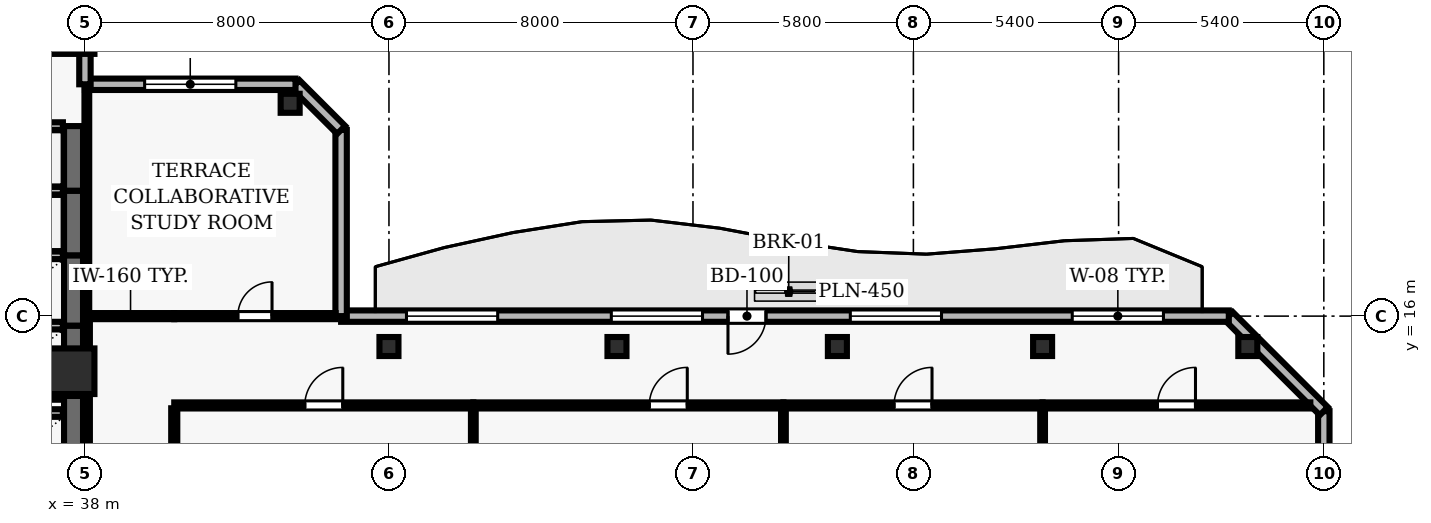
"""IFC4 building model, lengths in metres.
Left out: names, types, materials, properties, quantities, classifications, styles, units other than length and angle.
Written with IfcOpenShell. Run it as: python <this file> out.ifc"""

import sys

from ifc_helpers import new_model, si_unit, direction, frame, frame_2d, origin, origin_2d, place, context, subcontext, project, spatial, rectangle, hollow_rectangle, extrude, element, fill, save


model = new_model("IFC4")
c1 = context("Model", 3, precision=1e-05, world=origin(), true_north=direction((0.0, 1.0)))
c2 = subcontext(c1, "Body", "Model", "MODEL_VIEW")
j1 = project(units=[si_unit("LENGTHUNIT", "METRE"), si_unit("PLANEANGLEUNIT", "RADIAN")], contexts=[c1])
p1 = place(None, origin())
s1 = spatial("IfcSite", under=j1, at=p1, CompositionType="ELEMENT")
p2 = place(p1, origin())
s2 = spatial("IfcBuilding", under=s1, at=p2, CompositionType="ELEMENT")
p3 = place(p2, frame((0.0, 0.0, 161.9)))
s3 = spatial("IfcBuildingStorey", under=s2, at=p3, CompositionType="ELEMENT", Elevation=161.9)
for number, where, z_axis, x_axis in (
    (1, (37.65, 14.55, 0.0), (0.0, 0.0, 1.0), (1.0, 0.0, 0.0)),
    (2, (37.65, 23.5, 0.0), (0.0, 0.0, 1.0), (1.0, 0.0, 0.0)),
):
    element("IfcColumn", number, at=place(p3, frame(where, z_axis=z_axis, x_axis=x_axis)), inside=s3, PredefinedType="COLUMN", context=c2, shape_type="SweptSolid", body=[
        extrude(rectangle(XDim=1.2, YDim=1.2, at=origin_2d()), origin(), (0.0, 0.0, 1.0), 3.9),
    ])
for number, where, z_axis, x_axis in (
    (3, (46.0, 15.2, 0.0), (0.0, 0.0, 1.0), (1.0, 0.0, 0.0)),
    (4, (52.0, 15.2, 0.0), (0.0, 0.0, 1.0), (1.0, 0.0, 0.0)),
    (5, (57.8, 15.2, 0.0), (0.0, 0.0, 1.0), (1.0, 0.0, 0.0)),
    (6, (63.2, 15.2, 0.0), (0.0, 0.0, 1.0), (1.0, 0.0, 0.0)),
    (7, (68.6, 15.2, 0.0), (0.0, 0.0, 1.0), (1.0, 0.0, 0.0)),
    (8, (43.4, 21.6, 0.0), (0.0, 0.0, 1.0), (1.0, 0.0, 0.0)),
):
    element("IfcColumn", number, at=place(p3, frame(where, z_axis=z_axis, x_axis=x_axis)), inside=s3, PredefinedType="COLUMN", context=c2, shape_type="SweptSolid", body=[
        extrude(hollow_rectangle(XDim=0.5, YDim=0.5, WallThickness=0.025, at=origin_2d()), origin(), (0.0, 0.0, 1.0), 3.9),
    ])
p4 = place(p3, frame((70.6, 2.5, 0.0), z_axis=(0.0, 0.0, 1.0), x_axis=(0.0, 1.0, 0.0)))
e9 = element("IfcWall", 9, at=p4, inside=s3, PredefinedType="SOLIDWALL", context=c2, shape_type="SweptSolid", body=[
    extrude(rectangle(XDim=11.0, YDim=0.3, at=frame_2d((5.5, 0.0))), origin(), (0.0, 0.0, 1.0), 3.64),
])
p5 = place(p4, frame((2.0, 0.0, 0.9)))
e10 = element("IfcOpeningElement", 10, at=p5, cuts=e9, PredefinedType="OPENING", context=c2, shape_type="SweptSolid", body=[
    extrude(rectangle(XDim=1.5, YDim=1.8, at=frame_2d((0.75, 0.9))), frame((0.0, 0.16, 0.0), z_axis=(0.0, -1.0, 0.0), x_axis=(1.0, 0.0, 0.0)), (0.0, 0.0, 1.0), 0.32),
])
p6 = place(p4, frame((7.5, 0.0, 0.9)))
e11 = element("IfcOpeningElement", 11, at=p6, cuts=e9, PredefinedType="OPENING", context=c2, shape_type="SweptSolid", body=[
    extrude(rectangle(XDim=1.5, YDim=1.8, at=frame_2d((0.75, 0.9))), frame((0.0, 0.16, 0.0), z_axis=(0.0, -1.0, 0.0), x_axis=(1.0, 0.0, 0.0)), (0.0, 0.0, 1.0), 0.32),
])
p7 = place(p3, frame((70.6, 13.5, 0.0), z_axis=(0.0, 0.0, 1.0), x_axis=(-0.707106781187, 0.707106781187, 0.0)))
e12 = element("IfcWall", 12, at=p7, inside=s3, PredefinedType="SOLIDWALL", context=c2, shape_type="SweptSolid", body=[
    extrude(rectangle(XDim=3.536, YDim=0.3, at=frame_2d((1.768, 0.0))), origin(), (0.0, 0.0, 1.0), 3.64),
])
p8 = place(p3, frame((68.1, 16.0, 0.0), z_axis=(0.0, 0.0, 1.0), x_axis=(-1.0, 0.0, 0.0)))
e13 = element("IfcWall", 13, at=p8, inside=s3, PredefinedType="SOLIDWALL", context=c2, shape_type="SweptSolid", body=[
    extrude(rectangle(XDim=23.359, YDim=0.3, at=frame_2d((11.68, 0.0))), origin(), (0.0, 0.0, 1.0), 3.64),
])
p9 = place(p8, frame((12.179, 0.0, 0.0)))
e14 = element("IfcOpeningElement", 14, at=p9, cuts=e13, PredefinedType="OPENING", context=c2, shape_type="SweptSolid", body=[
    extrude(rectangle(XDim=1.0, YDim=2.2, at=frame_2d((0.5, 1.1))), frame((0.0, 0.16, 0.0), z_axis=(0.0, -1.0, 0.0), x_axis=(1.0, 0.0, 0.0)), (0.0, 0.0, 1.0), 0.32),
])
p10 = place(p8, frame((1.72, 0.0, 0.9)))
e15 = element("IfcOpeningElement", 15, at=p10, cuts=e13, PredefinedType="OPENING", context=c2, shape_type="SweptSolid", body=[
    extrude(rectangle(XDim=2.4, YDim=1.8, at=frame_2d((1.2, 0.9))), frame((0.0, 0.16, 0.0), z_axis=(0.0, -1.0, 0.0), x_axis=(1.0, 0.0, 0.0)), (0.0, 0.0, 1.0), 0.32),
])
p11 = place(p8, frame((7.56, 0.0, 0.9)))
e16 = element("IfcOpeningElement", 16, at=p11, cuts=e13, PredefinedType="OPENING", context=c2, shape_type="SweptSolid", body=[
    extrude(rectangle(XDim=2.4, YDim=1.8, at=frame_2d((1.2, 0.9))), frame((0.0, 0.16, 0.0), z_axis=(0.0, -1.0, 0.0), x_axis=(1.0, 0.0, 0.0)), (0.0, 0.0, 1.0), 0.32),
])
p12 = place(p8, frame((13.849, 0.0, 0.9)))
e17 = element("IfcOpeningElement", 17, at=p12, cuts=e13, PredefinedType="OPENING", context=c2, shape_type="SweptSolid", body=[
    extrude(rectangle(XDim=2.4, YDim=1.8, at=frame_2d((1.2, 0.9))), frame((0.0, 0.16, 0.0), z_axis=(0.0, -1.0, 0.0), x_axis=(1.0, 0.0, 0.0)), (0.0, 0.0, 1.0), 0.32),
])
p13 = place(p8, frame((19.239, 0.0, 0.9)))
e18 = element("IfcOpeningElement", 18, at=p13, cuts=e13, PredefinedType="OPENING", context=c2, shape_type="SweptSolid", body=[
    extrude(rectangle(XDim=2.4, YDim=1.8, at=frame_2d((1.2, 0.9))), frame((0.0, 0.16, 0.0), z_axis=(0.0, -1.0, 0.0), x_axis=(1.0, 0.0, 0.0)), (0.0, 0.0, 1.0), 0.32),
])
p14 = place(p3, frame((44.741, 16.0, 0.0), z_axis=(0.0, 0.0, 1.0), x_axis=(0.0, 1.0, 0.0)))
e19 = element("IfcWall", 19, at=p14, inside=s3, PredefinedType="SOLIDWALL", context=c2, shape_type="SweptSolid", body=[
    extrude(rectangle(XDim=4.9, YDim=0.3, at=frame_2d((2.45, 0.0))), origin(), (0.0, 0.0, 1.0), 3.64),
])
p15 = place(p3, frame((44.741, 20.9, 0.0), z_axis=(0.0, 0.0, 1.0), x_axis=(-0.707034851297, 0.707178703759, 0.0)))
e20 = element("IfcWall", 20, at=p15, inside=s3, PredefinedType="SOLIDWALL", context=c2, shape_type="SweptSolid", body=[
    extrude(rectangle(XDim=1.697, YDim=0.3, at=frame_2d((0.849, 0.0))), origin(), (0.0, 0.0, 1.0), 3.64),
])
p16 = place(p3, frame((43.541, 22.1, 0.0), z_axis=(0.0, 0.0, 1.0), x_axis=(-1.0, 0.0, 0.0)))
e21 = element("IfcWall", 21, at=p16, inside=s3, PredefinedType="SOLIDWALL", context=c2, shape_type="SweptSolid", body=[
    extrude(rectangle(XDim=5.541, YDim=0.3, at=frame_2d((2.771, 0.0))), origin(), (0.0, 0.0, 1.0), 3.64),
])
p17 = place(p16, frame((1.57, 0.0, 0.9)))
e22 = element("IfcOpeningElement", 22, at=p17, cuts=e21, PredefinedType="OPENING", context=c2, shape_type="SweptSolid", body=[
    extrude(rectangle(XDim=2.4, YDim=2.2, at=frame_2d((1.2, 1.1))), frame((0.0, 0.16, 0.0), z_axis=(0.0, -1.0, 0.0), x_axis=(1.0, 0.0, 0.0)), (0.0, 0.0, 1.0), 0.32),
])
p18 = place(p3, frame((38.0, 22.1, 0.0), z_axis=(0.0, 0.0, 1.0), x_axis=(0.0, 1.0, 0.0)))
e23 = element("IfcWall", 23, at=p18, inside=s3, PredefinedType="SOLIDWALL", context=c2, shape_type="SweptSolid", body=[
    extrude(rectangle(XDim=24.0, YDim=0.3, at=frame_2d((12.0, 0.0))), origin(), (0.0, 0.0, 1.0), 3.64),
])
p19 = place(p18, frame((10.5, 0.0, 0.0)))
e24 = element("IfcOpeningElement", 24, at=p19, cuts=e23, PredefinedType="OPENING", context=c2, shape_type="SweptSolid", body=[
    extrude(rectangle(XDim=1.0, YDim=2.2, at=frame_2d((0.5, 1.1))), frame((0.0, 0.16, 0.0), z_axis=(0.0, -1.0, 0.0), x_axis=(1.0, 0.0, 0.0)), (0.0, 0.0, 1.0), 0.32),
])
p20 = place(p18, frame((14.4, 0.0, 0.9)))
e25 = element("IfcOpeningElement", 25, at=p20, cuts=e23, PredefinedType="OPENING", context=c2, shape_type="SweptSolid", body=[
    extrude(rectangle(XDim=3.0, YDim=2.2, at=frame_2d((1.5, 1.1))), frame((0.0, 0.16, 0.0), z_axis=(0.0, -1.0, 0.0), x_axis=(1.0, 0.0, 0.0)), (0.0, 0.0, 1.0), 0.32),
])
p21 = place(p18, frame((19.95, 0.0, 0.9)))
e26 = element("IfcOpeningElement", 26, at=p21, cuts=e23, PredefinedType="OPENING", context=c2, shape_type="SweptSolid", body=[
    extrude(rectangle(XDim=3.0, YDim=2.2, at=frame_2d((1.5, 1.1))), frame((0.0, 0.16, 0.0), z_axis=(0.0, -1.0, 0.0), x_axis=(1.0, 0.0, 0.0)), (0.0, 0.0, 1.0), 0.32),
])
p22 = place(p3, frame((37.7, 11.55, 0.0), z_axis=(0.0, 0.0, 1.0), x_axis=(0.0, 1.0, 0.0)))
e27 = element("IfcWall", 27, at=p22, inside=s3, PredefinedType="SHEAR", context=c2, shape_type="SweptSolid", body=[
    extrude(rectangle(XDim=2.35, YDim=0.5, at=frame_2d((1.175, 0.0))), origin(), (0.0, 0.0, 1.0), 3.64),
])
p23 = place(p3, frame((37.42, 13.45, 0.0), z_axis=(0.0, 0.0, 1.0), x_axis=(-1.0, 0.0, 0.0)))
e28 = element("IfcWall", 28, at=p23, inside=s3, PredefinedType="SOLIDWALL", context=c2, shape_type="SweptSolid", body=[
    extrude(rectangle(XDim=2.14, YDim=0.2, at=frame_2d((1.07, 0.0))), origin(), (0.0, 0.0, 1.0), 3.64),
])
p24 = place(p3, frame((37.7, 13.9, 0.0), z_axis=(0.0, 0.0, 1.0), x_axis=(0.0, 1.0, 0.0)))
e29 = element("IfcWall", 29, at=p24, inside=s3, PredefinedType="SHEAR", context=c2, shape_type="SweptSolid", body=[
    extrude(rectangle(XDim=1.85, YDim=0.5, at=frame_2d((0.925, 0.0))), origin(), (0.0, 0.0, 1.0), 3.64),
])
for number, where, z_axis, x_axis in (
    (30, (35.28, 13.9, 0.0), (0.0, 0.0, 1.0), (1.0, 0.0, 0.0)),
    (31, (37.42, 15.75, 0.0), (0.0, 0.0, 1.0), (-1.0, 0.0, 0.0)),
):
    element("IfcWall", number, at=place(p3, frame(where, z_axis=z_axis, x_axis=x_axis)), inside=s3, PredefinedType="SOLIDWALL", context=c2, shape_type="SweptSolid", body=[
        extrude(rectangle(XDim=2.14, YDim=0.2, at=frame_2d((1.07, 0.0))), origin(), (0.0, 0.0, 1.0), 3.64),
    ])
p25 = place(p3, frame((37.7, 15.75, 0.0), z_axis=(0.0, 0.0, 1.0), x_axis=(0.0, 1.0, 0.0)))
e32 = element("IfcWall", 32, at=p25, inside=s3, PredefinedType="SHEAR", context=c2, shape_type="SweptSolid", body=[
    extrude(rectangle(XDim=1.85, YDim=0.5, at=frame_2d((0.925, 0.0))), origin(), (0.0, 0.0, 1.0), 3.64),
])
p26 = place(p3, frame((37.42, 17.6, 0.0), z_axis=(0.0, 0.0, 1.0), x_axis=(-1.0, 0.0, 0.0)))
e33 = element("IfcWall", 33, at=p26, inside=s3, PredefinedType="SOLIDWALL", context=c2, shape_type="SweptSolid", body=[
    extrude(rectangle(XDim=2.14, YDim=0.2, at=frame_2d((1.07, 0.0))), origin(), (0.0, 0.0, 1.0), 3.64),
])
p27 = place(p3, frame((37.7, 17.6, 0.0), z_axis=(0.0, 0.0, 1.0), x_axis=(0.0, 1.0, 0.0)))
e34 = element("IfcWall", 34, at=p27, inside=s3, PredefinedType="SHEAR", context=c2, shape_type="SweptSolid", body=[
    extrude(rectangle(XDim=1.7, YDim=0.5, at=frame_2d((0.85, 0.0))), origin(), (0.0, 0.0, 1.0), 3.64),
])
p28 = place(p3, frame((37.42, 19.3, 0.0), z_axis=(0.0, 0.0, 1.0), x_axis=(-1.0, 0.0, 0.0)))
e35 = element("IfcWall", 35, at=p28, inside=s3, PredefinedType="SOLIDWALL", context=c2, shape_type="SweptSolid", body=[
    extrude(rectangle(XDim=2.14, YDim=0.2, at=frame_2d((1.07, 0.0))), origin(), (0.0, 0.0, 1.0), 3.64),
])
p29 = place(p3, frame((37.7, 19.3, 0.0), z_axis=(0.0, 0.0, 1.0), x_axis=(0.0, 1.0, 0.0)))
e36 = element("IfcWall", 36, at=p29, inside=s3, PredefinedType="SHEAR", context=c2, shape_type="SweptSolid", body=[
    extrude(rectangle(XDim=1.7, YDim=0.5, at=frame_2d((0.85, 0.0))), origin(), (0.0, 0.0, 1.0), 3.64),
])
p30 = place(p3, frame((37.42, 21.0, 0.0), z_axis=(0.0, 0.0, 1.0), x_axis=(-1.0, 0.0, 0.0)))
e37 = element("IfcWall", 37, at=p30, inside=s3, PredefinedType="SOLIDWALL", context=c2, shape_type="SweptSolid", body=[
    extrude(rectangle(XDim=2.14, YDim=0.2, at=frame_2d((1.07, 0.0))), origin(), (0.0, 0.0, 1.0), 3.64),
])
p31 = place(p3, frame((40.35, 13.65, 0.0), z_axis=(0.0, 0.0, 1.0), x_axis=(1.0, 0.0, 0.0)))
e38 = element("IfcWall", 38, at=p31, inside=s3, PredefinedType="PARTITIONING", context=c2, shape_type="SweptSolid", body=[
    extrude(rectangle(XDim=7.87, YDim=0.16, at=frame_2d((3.935, 0.0))), origin(), (0.0, 0.0, 1.0), 3.64),
])
p32 = place(p31, frame((3.435, 0.0, 0.0)))
e39 = element("IfcOpeningElement", 39, at=p32, cuts=e38, PredefinedType="OPENING", context=c2, shape_type="SweptSolid", body=[
    extrude(rectangle(XDim=1.0, YDim=2.1, at=frame_2d((0.5, 1.05))), frame((0.0, 0.09, 0.0), z_axis=(0.0, -1.0, 0.0), x_axis=(1.0, 0.0, 0.0)), (0.0, 0.0, 1.0), 0.18),
])
p33 = place(p3, frame((40.35, 16.0, 0.0), z_axis=(0.0, 0.0, 1.0), x_axis=(-1.0, 0.0, 0.0)))
e40 = element("IfcWall", 40, at=p33, inside=s3, PredefinedType="PARTITIONING", context=c2, shape_type="SweptSolid", body=[
    extrude(rectangle(XDim=2.3, YDim=0.16, at=frame_2d((1.15, 0.0))), origin(), (0.0, 0.0, 1.0), 3.64),
])
p34 = place(p3, frame((40.35, 16.0, 0.0), z_axis=(0.0, 0.0, 1.0), x_axis=(1.0, 0.0, 0.0)))
e41 = element("IfcWall", 41, at=p34, inside=s3, PredefinedType="PARTITIONING", context=c2, shape_type="SweptSolid", body=[
    extrude(rectangle(XDim=4.246, YDim=0.16, at=frame_2d((2.123, 0.0))), origin(), (0.0, 0.0, 1.0), 3.64),
])
p35 = place(p34, frame((1.673, 0.0, 0.0)))
e42 = element("IfcOpeningElement", 42, at=p35, cuts=e41, PredefinedType="OPENING", context=c2, shape_type="SweptSolid", body=[
    extrude(rectangle(XDim=0.9, YDim=2.1, at=frame_2d((0.45, 1.05))), frame((0.0, 0.09, 0.0), z_axis=(0.0, -1.0, 0.0), x_axis=(1.0, 0.0, 0.0)), (0.0, 0.0, 1.0), 0.18),
])
p36 = place(p3, frame((48.22, 13.65, 0.0), z_axis=(0.0, 0.0, 1.0), x_axis=(1.0, 0.0, 0.0)))
e43 = element("IfcWall", 43, at=p36, inside=s3, PredefinedType="PARTITIONING", context=c2, shape_type="SweptSolid", body=[
    extrude(rectangle(XDim=8.16, YDim=0.16, at=frame_2d((4.08, 0.0))), origin(), (0.0, 0.0, 1.0), 3.64),
])
p37 = place(p36, frame((4.63, 0.0, 0.0)))
e44 = element("IfcOpeningElement", 44, at=p37, cuts=e43, PredefinedType="OPENING", context=c2, shape_type="SweptSolid", body=[
    extrude(rectangle(XDim=1.0, YDim=2.1, at=frame_2d((0.5, 1.05))), frame((0.0, 0.09, 0.0), z_axis=(0.0, -1.0, 0.0), x_axis=(1.0, 0.0, 0.0)), (0.0, 0.0, 1.0), 0.18),
])
p38 = place(p3, frame((56.38, 13.65, 0.0), z_axis=(0.0, 0.0, 1.0), x_axis=(1.0, 0.0, 0.0)))
e45 = element("IfcWall", 45, at=p38, inside=s3, PredefinedType="PARTITIONING", context=c2, shape_type="SweptSolid", body=[
    extrude(rectangle(XDim=6.82, YDim=0.16, at=frame_2d((3.41, 0.0))), origin(), (0.0, 0.0, 1.0), 3.64),
])
p39 = place(p38, frame((2.91, 0.0, 0.0)))
e46 = element("IfcOpeningElement", 46, at=p39, cuts=e45, PredefinedType="OPENING", context=c2, shape_type="SweptSolid", body=[
    extrude(rectangle(XDim=1.0, YDim=2.1, at=frame_2d((0.5, 1.05))), frame((0.0, 0.09, 0.0), z_axis=(0.0, -1.0, 0.0), x_axis=(1.0, 0.0, 0.0)), (0.0, 0.0, 1.0), 0.18),
])
p40 = place(p3, frame((63.2, 13.65, 0.0), z_axis=(0.0, 0.0, 1.0), x_axis=(1.0, 0.0, 0.0)))
e47 = element("IfcWall", 47, at=p40, inside=s3, PredefinedType="PARTITIONING", context=c2, shape_type="SweptSolid", body=[
    extrude(rectangle(XDim=7.045, YDim=0.16, at=frame_2d((3.522, 0.0))), origin(), (0.0, 0.0, 1.0), 3.64),
])
p41 = place(p40, frame((3.023, 0.0, 0.0)))
e48 = element("IfcOpeningElement", 48, at=p41, cuts=e47, PredefinedType="OPENING", context=c2, shape_type="SweptSolid", body=[
    extrude(rectangle(XDim=1.0, YDim=2.1, at=frame_2d((0.5, 1.05))), frame((0.0, 0.09, 0.0), z_axis=(0.0, -1.0, 0.0), x_axis=(1.0, 0.0, 0.0)), (0.0, 0.0, 1.0), 0.18),
])
p42 = place(p3, frame((38.05, 15.925, 0.0), z_axis=(0.0, 0.0, 1.0), x_axis=(0.0, -1.0, 0.0)))
e49 = element("IfcWall", 49, at=p42, inside=s3, PredefinedType="PARTITIONING", context=c2, shape_type="SweptSolid", body=[
    extrude(rectangle(XDim=6.375, YDim=0.16, at=frame_2d((3.188, 0.0))), origin(), (0.0, 0.0, 1.0), 3.023),
])
p43 = place(p3, frame((38.05, 21.955, 0.0), z_axis=(0.0, 0.0, 1.0), x_axis=(0.0, -1.0, 0.0)))
e50 = element("IfcWall", 50, at=p43, inside=s3, PredefinedType="PARTITIONING", context=c2, shape_type="SweptSolid", body=[
    extrude(rectangle(XDim=5.88, YDim=0.125, at=frame_2d((2.94, 0.0))), origin(), (0.0, 0.0, 1.0), 3.023),
])
p44 = place(p3, frame((40.35, 8.0, 0.0), z_axis=(0.0, 0.0, 1.0), x_axis=(0.0, 1.0, 0.0)))
e51 = element("IfcWall", 51, at=p44, inside=s3, PredefinedType="PARTITIONING", context=c2, shape_type="SweptSolid", body=[
    extrude(rectangle(XDim=5.575, YDim=0.16, at=frame_2d((2.788, 0.0))), origin(), (0.0, 0.0, 1.0), 3.64),
])
for number, where, z_axis, x_axis in (
    (52, (48.22, 8.008, 0.0), (0.0, 0.0, 1.0), (0.0, 1.0, 0.0)),
    (53, (56.38, 8.008, 0.0), (0.0, 0.0, 1.0), (0.0, 1.0, 0.0)),
):
    element("IfcWall", number, at=place(p3, frame(where, z_axis=z_axis, x_axis=x_axis)), inside=s3, PredefinedType="PARTITIONING", context=c2, shape_type="SweptSolid", body=[
        extrude(rectangle(XDim=5.567, YDim=0.125, at=frame_2d((2.783, 0.0))), origin(), (0.0, 0.0, 1.0), 3.64),
    ])
p45 = place(p3, frame((63.2, 8.008, 0.0), z_axis=(0.0, 0.0, 1.0), x_axis=(0.0, 1.0, 0.0)))
e54 = element("IfcWall", 54, at=p45, inside=s3, PredefinedType="PARTITIONING", context=c2, shape_type="SweptSolid", body=[
    extrude(rectangle(XDim=5.567, YDim=0.125, at=frame_2d((2.783, 0.0))), origin(), (0.0, 0.0, 1.0), 3.023),
])
p46 = place(p9, origin())
e55 = element("IfcDoor", 55, at=p46, inside=s3, OperationType="SINGLE_SWING_RIGHT", PredefinedType="DOOR", context=c2, shape_type="SweptSolid", body=[
    extrude(rectangle(XDim=1.0, YDim=2.2, at=frame_2d((0.5, 1.1))), frame((0.0, 0.025, 0.0), z_axis=(0.0, -1.0, 0.0), x_axis=(1.0, 0.0, 0.0)), (0.0, 0.0, 1.0), 0.05),
])
fill(e14, e55)
p47 = place(p10, origin())
e56 = element("IfcWindow", 56, at=p47, inside=s3, PartitioningType="SINGLE_PANEL", PredefinedType="WINDOW", context=c2, shape_type="SweptSolid", body=[
    extrude(rectangle(XDim=2.4, YDim=1.8, at=frame_2d((1.2, 0.9))), frame((0.0, 0.03, 0.0), z_axis=(0.0, -1.0, 0.0), x_axis=(1.0, 0.0, 0.0)), (0.0, 0.0, 1.0), 0.06),
])
fill(e15, e56)
p48 = place(p11, origin())
e57 = element("IfcWindow", 57, at=p48, inside=s3, PartitioningType="SINGLE_PANEL", PredefinedType="WINDOW", context=c2, shape_type="SweptSolid", body=[
    extrude(rectangle(XDim=2.4, YDim=1.8, at=frame_2d((1.2, 0.9))), frame((0.0, 0.03, 0.0), z_axis=(0.0, -1.0, 0.0), x_axis=(1.0, 0.0, 0.0)), (0.0, 0.0, 1.0), 0.06),
])
fill(e16, e57)
p49 = place(p12, origin())
e58 = element("IfcWindow", 58, at=p49, inside=s3, PartitioningType="SINGLE_PANEL", PredefinedType="WINDOW", context=c2, shape_type="SweptSolid", body=[
    extrude(rectangle(XDim=2.4, YDim=1.8, at=frame_2d((1.2, 0.9))), frame((0.0, 0.03, 0.0), z_axis=(0.0, -1.0, 0.0), x_axis=(1.0, 0.0, 0.0)), (0.0, 0.0, 1.0), 0.06),
])
fill(e17, e58)
p50 = place(p13, origin())
e59 = element("IfcWindow", 59, at=p50, inside=s3, PartitioningType="SINGLE_PANEL", PredefinedType="WINDOW", context=c2, shape_type="SweptSolid", body=[
    extrude(rectangle(XDim=2.4, YDim=1.8, at=frame_2d((1.2, 0.9))), frame((0.0, 0.03, 0.0), z_axis=(0.0, -1.0, 0.0), x_axis=(1.0, 0.0, 0.0)), (0.0, 0.0, 1.0), 0.06),
])
fill(e18, e59)
p51 = place(p17, origin())
e60 = element("IfcWindow", 60, at=p51, inside=s3, PartitioningType="SINGLE_PANEL", PredefinedType="WINDOW", context=c2, shape_type="SweptSolid", body=[
    extrude(rectangle(XDim=2.4, YDim=2.2, at=frame_2d((1.2, 1.1))), frame((0.0, 0.03, 0.0), z_axis=(0.0, -1.0, 0.0), x_axis=(1.0, 0.0, 0.0)), (0.0, 0.0, 1.0), 0.06),
])
fill(e22, e60)
p52 = place(p32, origin())
e61 = element("IfcDoor", 61, at=p52, inside=s3, OperationType="SINGLE_SWING_RIGHT", PredefinedType="DOOR", context=c2, shape_type="SweptSolid", body=[
    extrude(rectangle(XDim=1.0, YDim=2.1, at=frame_2d((0.5, 1.05))), frame((0.0, 0.025, 0.0), z_axis=(0.0, -1.0, 0.0), x_axis=(1.0, 0.0, 0.0)), (0.0, 0.0, 1.0), 0.05),
])
fill(e39, e61)
p53 = place(p37, origin())
e62 = element("IfcDoor", 62, at=p53, inside=s3, OperationType="SINGLE_SWING_RIGHT", PredefinedType="DOOR", context=c2, shape_type="SweptSolid", body=[
    extrude(rectangle(XDim=1.0, YDim=2.1, at=frame_2d((0.5, 1.05))), frame((0.0, 0.025, 0.0), z_axis=(0.0, -1.0, 0.0), x_axis=(1.0, 0.0, 0.0)), (0.0, 0.0, 1.0), 0.05),
])
fill(e44, e62)
p54 = place(p39, origin())
e63 = element("IfcDoor", 63, at=p54, inside=s3, OperationType="SINGLE_SWING_RIGHT", PredefinedType="DOOR", context=c2, shape_type="SweptSolid", body=[
    extrude(rectangle(XDim=1.0, YDim=2.1, at=frame_2d((0.5, 1.05))), frame((0.0, 0.025, 0.0), z_axis=(0.0, -1.0, 0.0), x_axis=(1.0, 0.0, 0.0)), (0.0, 0.0, 1.0), 0.05),
])
fill(e46, e63)
p55 = place(p41, origin())
e64 = element("IfcDoor", 64, at=p55, inside=s3, OperationType="SINGLE_SWING_RIGHT", PredefinedType="DOOR", context=c2, shape_type="SweptSolid", body=[
    extrude(rectangle(XDim=1.0, YDim=2.1, at=frame_2d((0.5, 1.05))), frame((0.0, 0.025, 0.0), z_axis=(0.0, -1.0, 0.0), x_axis=(1.0, 0.0, 0.0)), (0.0, 0.0, 1.0), 0.05),
])
fill(e48, e64)
p56 = place(p35, origin())
e65 = element("IfcDoor", 65, at=p56, inside=s3, OperationType="SINGLE_SWING_RIGHT", PredefinedType="DOOR", context=c2, shape_type="SweptSolid", body=[
    extrude(rectangle(XDim=0.9, YDim=2.1, at=frame_2d((0.45, 1.05))), frame((0.0, 0.025, 0.0), z_axis=(0.0, -1.0, 0.0), x_axis=(1.0, 0.0, 0.0)), (0.0, 0.0, 1.0), 0.05),
])
fill(e42, e65)
save(model, sys.argv[1])
